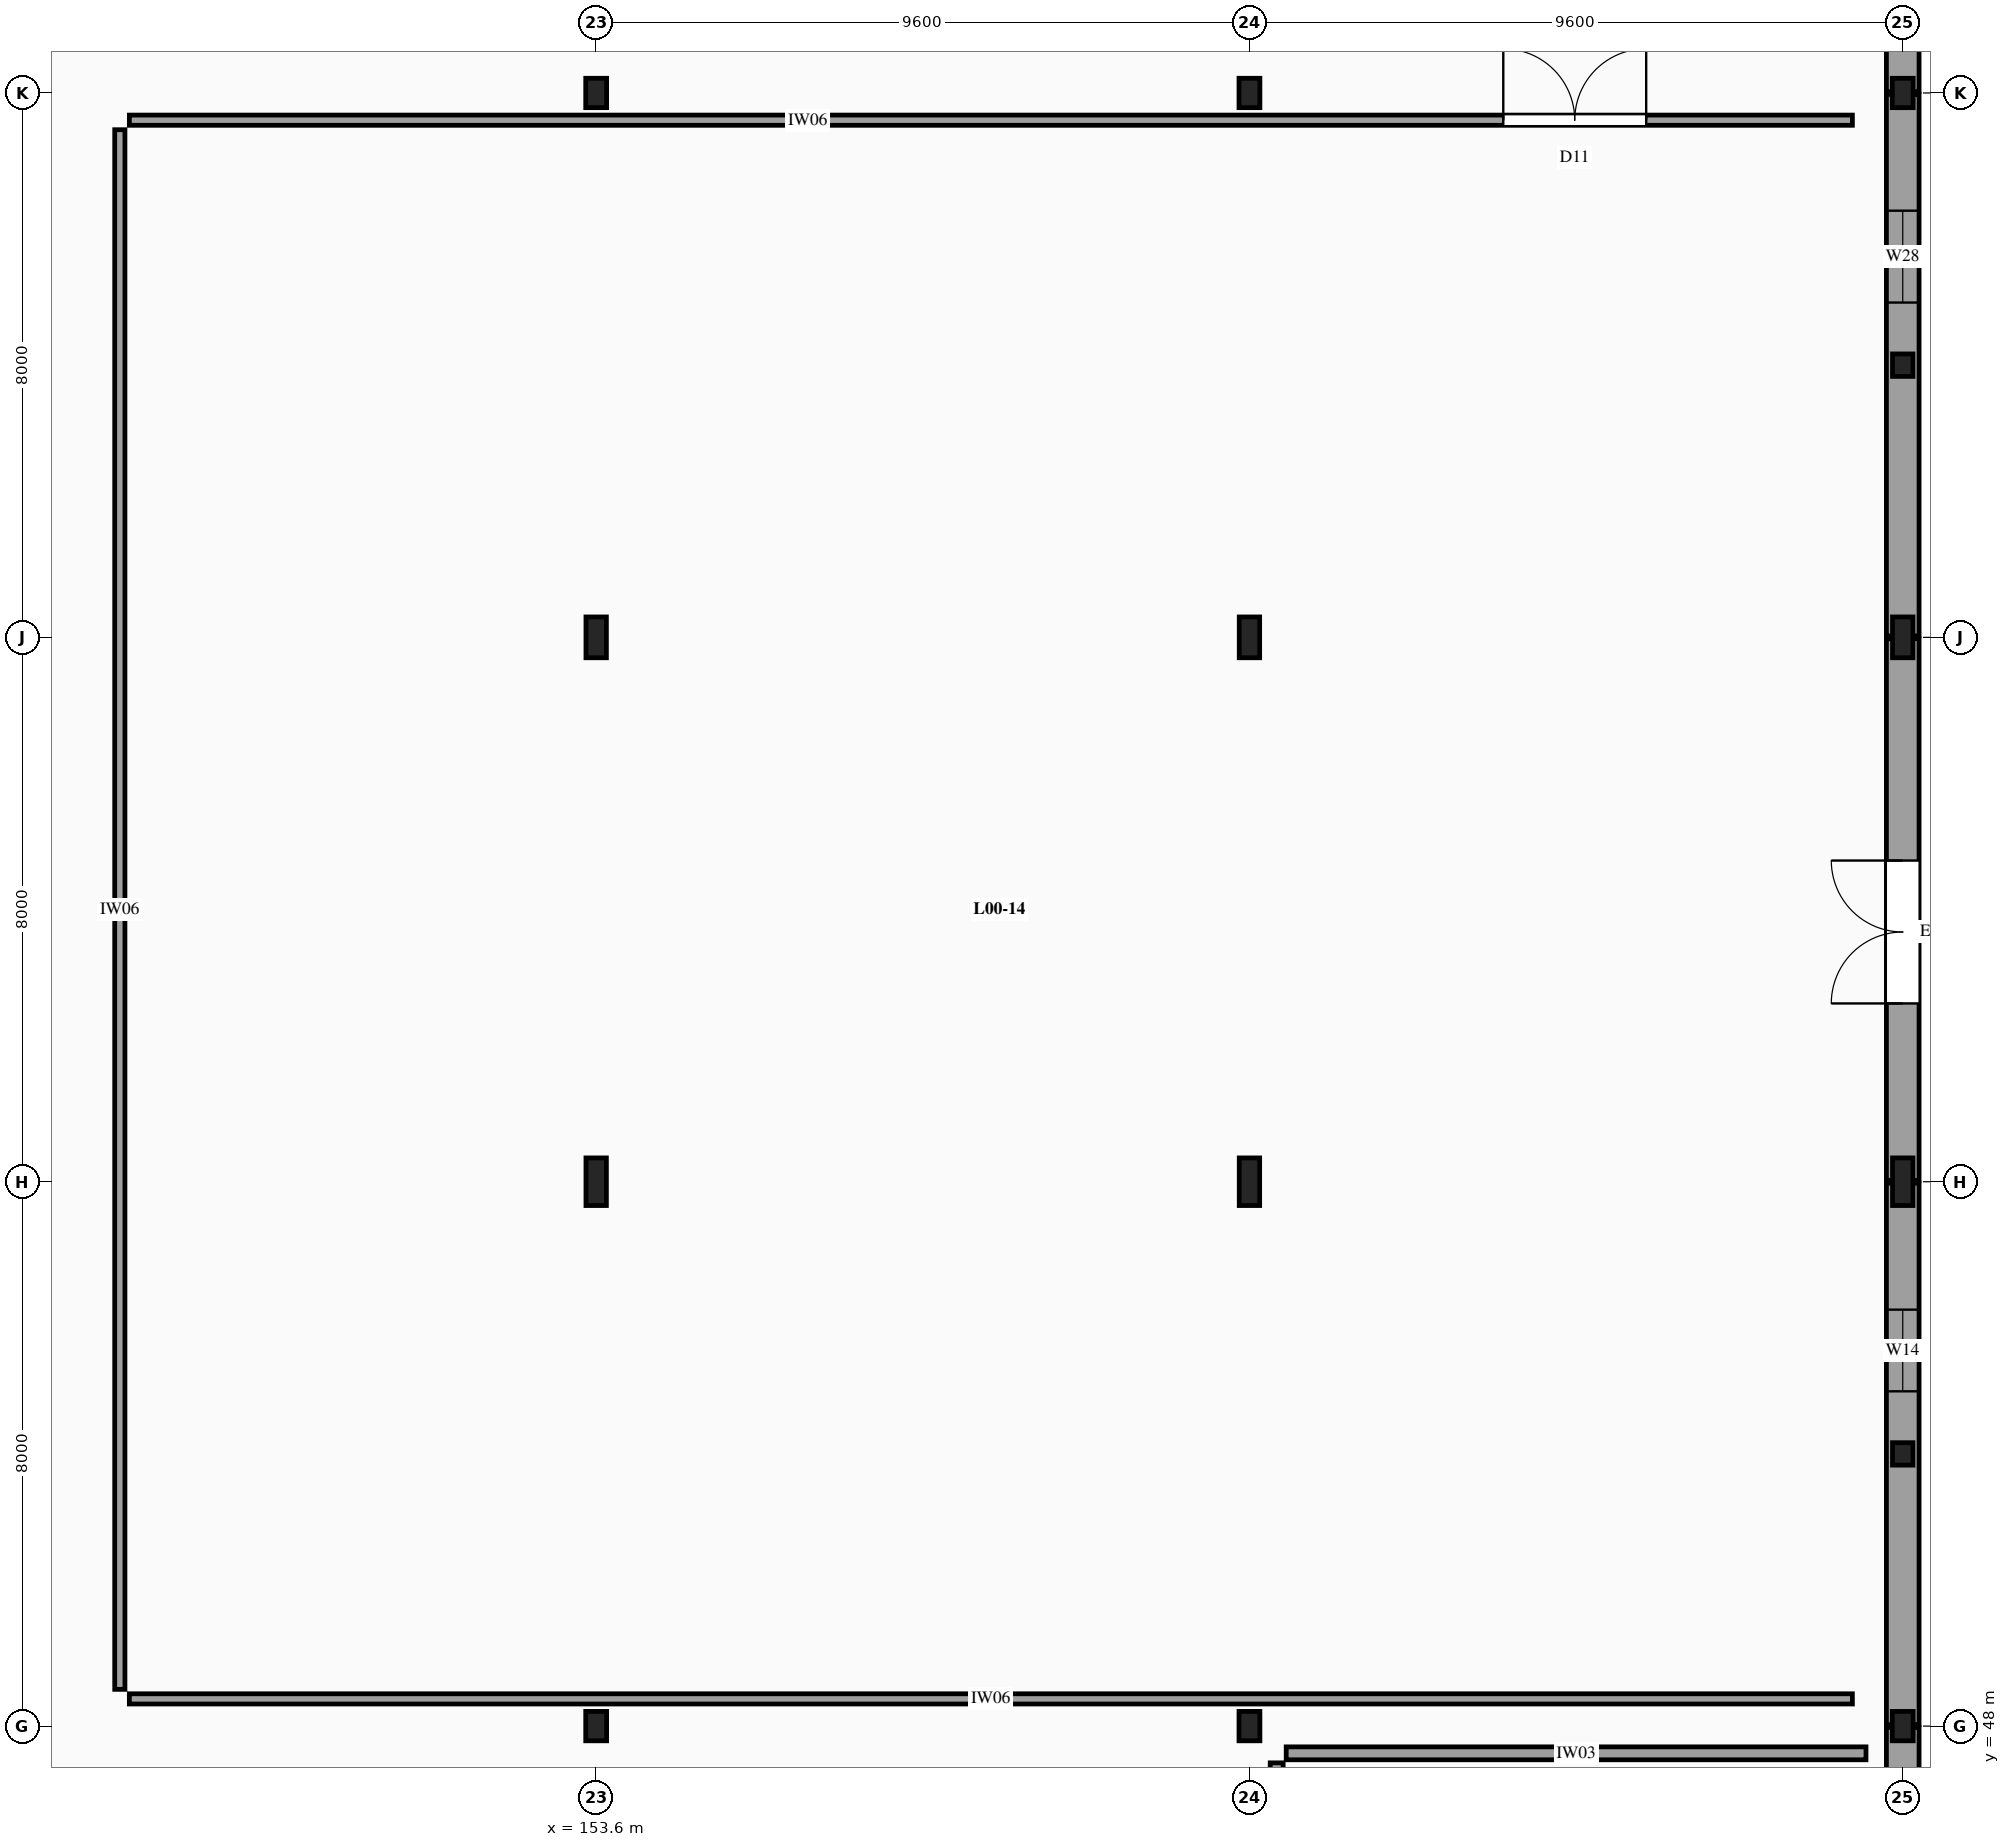
"""IFC4 building model, lengths in metres.
Left out: names, types, materials, properties, quantities, classifications, styles, units other than length and angle.
Written with IfcOpenShell. Run it as: python <this file> out.ifc"""

import sys

from ifc_helpers import new_model, si_unit, direction, frame, frame_2d, origin, origin_2d, place, context, subcontext, project, spatial, rectangle, i_section, extrude, element, fill, save


model = new_model("IFC4")
c1 = context("Model", 3, precision=1e-05, world=origin(), true_north=direction((0.0, 1.0)))
c2 = subcontext(c1, "Body", "Model", "MODEL_VIEW")
j1 = project(units=[si_unit("LENGTHUNIT", "METRE"), si_unit("PLANEANGLEUNIT", "RADIAN")], contexts=[c1])
p1 = place(None, origin())
s1 = spatial("IfcSite", under=j1, at=p1, CompositionType="ELEMENT")
p2 = place(p1, origin())
s2 = spatial("IfcBuilding", under=s1, at=p2, CompositionType="ELEMENT")
p3 = place(p2, origin())
s3 = spatial("IfcBuildingStorey", under=s2, at=p3, CompositionType="ELEMENT", Elevation=0.0)
p4 = place(p3, frame((153.6, 48.0, -0.28), z_axis=(0.0, 0.0, 1.0), x_axis=(1.0, 0.0, 0.0)))
e1 = element("IfcColumn", 1, at=p4, inside=s3, PredefinedType="COLUMN", context=c2, shape_type="SweptSolid", body=[
    extrude(i_section(OverallWidth=0.307, OverallDepth=0.432, WebThickness=0.021, FlangeThickness=0.04, FilletRadius=0.027, at=origin_2d()), origin(), (0.0, 0.0, 1.0), 4.52),
])
p5 = place(p3, frame((153.6, 56.0, -0.28), z_axis=(0.0, 0.0, 1.0), x_axis=(1.0, 0.0, 0.0)))
e2 = element("IfcColumn", 2, at=p5, inside=s3, PredefinedType="COLUMN", context=c2, shape_type="SweptSolid", body=[
    extrude(i_section(OverallWidth=0.3, OverallDepth=0.7, WebThickness=0.017, FlangeThickness=0.032, FilletRadius=0.027, at=origin_2d()), origin(), (0.0, 0.0, 1.0), 4.52),
])
p6 = place(p3, frame((153.6, 64.0, -0.28), z_axis=(0.0, 0.0, 1.0), x_axis=(1.0, 0.0, 0.0)))
e3 = element("IfcColumn", 3, at=p6, inside=s3, PredefinedType="COLUMN", context=c2, shape_type="SweptSolid", body=[
    extrude(i_section(OverallWidth=0.3, OverallDepth=0.6, WebThickness=0.015, FlangeThickness=0.03, FilletRadius=0.027, at=origin_2d()), origin(), (0.0, 0.0, 1.0), 4.52),
])
for number, where, z_axis, x_axis in (
    (4, (153.6, 72.0, -0.28), (0.0, 0.0, 1.0), (1.0, 0.0, 0.0)),
    (5, (163.2, 48.0, -0.28), (0.0, 0.0, 1.0), (1.0, 0.0, 0.0)),
):
    element("IfcColumn", number, at=place(p3, frame(where, z_axis=z_axis, x_axis=x_axis)), inside=s3, PredefinedType="COLUMN", context=c2, shape_type="SweptSolid", body=[
        extrude(i_section(OverallWidth=0.307, OverallDepth=0.432, WebThickness=0.021, FlangeThickness=0.04, FilletRadius=0.027, at=origin_2d()), origin(), (0.0, 0.0, 1.0), 4.52),
    ])
p7 = place(p3, frame((163.2, 56.0, -0.28), z_axis=(0.0, 0.0, 1.0), x_axis=(1.0, 0.0, 0.0)))
e6 = element("IfcColumn", 6, at=p7, inside=s3, PredefinedType="COLUMN", context=c2, shape_type="SweptSolid", body=[
    extrude(i_section(OverallWidth=0.3, OverallDepth=0.7, WebThickness=0.017, FlangeThickness=0.032, FilletRadius=0.027, at=origin_2d()), origin(), (0.0, 0.0, 1.0), 4.52),
])
p8 = place(p3, frame((163.2, 64.0, -0.28), z_axis=(0.0, 0.0, 1.0), x_axis=(1.0, 0.0, 0.0)))
e7 = element("IfcColumn", 7, at=p8, inside=s3, PredefinedType="COLUMN", context=c2, shape_type="SweptSolid", body=[
    extrude(i_section(OverallWidth=0.3, OverallDepth=0.6, WebThickness=0.015, FlangeThickness=0.03, FilletRadius=0.027, at=origin_2d()), origin(), (0.0, 0.0, 1.0), 4.52),
])
for number, where, z_axis, x_axis in (
    (8, (163.2, 72.0, -0.28), (0.0, 0.0, 1.0), (1.0, 0.0, 0.0)),
    (9, (172.8, 48.0, -0.28), (0.0, 0.0, 1.0), (1.0, 0.0, 0.0)),
):
    element("IfcColumn", number, at=place(p3, frame(where, z_axis=z_axis, x_axis=x_axis)), inside=s3, PredefinedType="COLUMN", context=c2, shape_type="SweptSolid", body=[
        extrude(i_section(OverallWidth=0.307, OverallDepth=0.432, WebThickness=0.021, FlangeThickness=0.04, FilletRadius=0.027, at=origin_2d()), origin(), (0.0, 0.0, 1.0), 4.52),
    ])
p9 = place(p3, frame((172.8, 56.0, -0.28), z_axis=(0.0, 0.0, 1.0), x_axis=(1.0, 0.0, 0.0)))
e10 = element("IfcColumn", 10, at=p9, inside=s3, PredefinedType="COLUMN", context=c2, shape_type="SweptSolid", body=[
    extrude(i_section(OverallWidth=0.3, OverallDepth=0.7, WebThickness=0.017, FlangeThickness=0.032, FilletRadius=0.027, at=origin_2d()), origin(), (0.0, 0.0, 1.0), 4.52),
])
p10 = place(p3, frame((172.8, 64.0, -0.28), z_axis=(0.0, 0.0, 1.0), x_axis=(1.0, 0.0, 0.0)))
e11 = element("IfcColumn", 11, at=p10, inside=s3, PredefinedType="COLUMN", context=c2, shape_type="SweptSolid", body=[
    extrude(i_section(OverallWidth=0.3, OverallDepth=0.6, WebThickness=0.015, FlangeThickness=0.03, FilletRadius=0.027, at=origin_2d()), origin(), (0.0, 0.0, 1.0), 4.52),
])
p11 = place(p3, frame((172.8, 72.0, -0.28), z_axis=(0.0, 0.0, 1.0), x_axis=(1.0, 0.0, 0.0)))
e12 = element("IfcColumn", 12, at=p11, inside=s3, PredefinedType="COLUMN", context=c2, shape_type="SweptSolid", body=[
    extrude(i_section(OverallWidth=0.307, OverallDepth=0.432, WebThickness=0.021, FlangeThickness=0.04, FilletRadius=0.027, at=origin_2d()), origin(), (0.0, 0.0, 1.0), 4.52),
])
for number, where, z_axis, x_axis in (
    (13, (172.8, 52.0, -0.28), (0.0, 0.0, 1.0), (1.0, 0.0, 0.0)),
    (14, (172.8, 68.0, -0.28), (0.0, 0.0, 1.0), (1.0, 0.0, 0.0)),
):
    element("IfcColumn", number, at=place(p3, frame(where, z_axis=z_axis, x_axis=x_axis)), inside=s3, PredefinedType="PILASTER", context=c2, shape_type="SweptSolid", body=[
        extrude(i_section(OverallWidth=0.3, OverallDepth=0.33, WebThickness=0.01, FlangeThickness=0.017, FilletRadius=0.027, at=origin_2d()), origin(), (0.0, 0.0, 1.0), 4.52),
    ])
p12 = place(p3, frame((172.8, 40.02, 0.0), z_axis=(0.0, 0.0, 1.0), x_axis=(0.0, 1.0, 0.0)))
e15 = element("IfcWall", 15, at=p12, inside=s3, PredefinedType="SOLIDWALL", context=c2, shape_type="SweptSolid", body=[
    extrude(rectangle(XDim=7.96, YDim=0.48, at=frame_2d((3.98, 0.0))), origin(), (0.0, 0.0, 1.0), 3.56),
])
p13 = place(p12, frame((2.6, 0.0, 0.0)))
e16 = element("IfcOpeningElement", 16, at=p13, cuts=e15, PredefinedType="OPENING", context=c2, shape_type="SweptSolid", body=[
    extrude(rectangle(XDim=2.1, YDim=2.4, at=frame_2d((1.05, 1.2))), frame((0.0, 0.25, 0.0), z_axis=(0.0, -1.0, 0.0), x_axis=(1.0, 0.0, 0.0)), (0.0, 0.0, 1.0), 0.5),
])
p14 = place(p3, frame((172.8, 48.02, 0.0), z_axis=(0.0, 0.0, 1.0), x_axis=(0.0, 1.0, 0.0)))
e17 = element("IfcWall", 17, at=p14, inside=s3, PredefinedType="SOLIDWALL", context=c2, shape_type="SweptSolid", body=[
    extrude(rectangle(XDim=7.96, YDim=0.48, at=frame_2d((3.98, 0.0))), origin(), (0.0, 0.0, 1.0), 3.56),
])
p15 = place(p14, frame((4.9, 0.0, 0.9)))
e18 = element("IfcOpeningElement", 18, at=p15, cuts=e17, PredefinedType="OPENING", context=c2, shape_type="SweptSolid", body=[
    extrude(rectangle(XDim=1.2, YDim=1.8, at=frame_2d((0.6, 0.9))), frame((0.0, 0.25, 0.0), z_axis=(0.0, -1.0, 0.0), x_axis=(1.0, 0.0, 0.0)), (0.0, 0.0, 1.0), 0.5),
])
p16 = place(p3, frame((172.8, 56.02, 0.0), z_axis=(0.0, 0.0, 1.0), x_axis=(0.0, 1.0, 0.0)))
e19 = element("IfcWall", 19, at=p16, inside=s3, PredefinedType="SOLIDWALL", context=c2, shape_type="SweptSolid", body=[
    extrude(rectangle(XDim=7.96, YDim=0.48, at=frame_2d((3.98, 0.0))), origin(), (0.0, 0.0, 1.0), 3.56),
])
p17 = place(p16, frame((2.6, 0.0, 0.0)))
e20 = element("IfcOpeningElement", 20, at=p17, cuts=e19, PredefinedType="OPENING", context=c2, shape_type="SweptSolid", body=[
    extrude(rectangle(XDim=2.1, YDim=2.4, at=frame_2d((1.05, 1.2))), frame((0.0, 0.25, 0.0), z_axis=(0.0, -1.0, 0.0), x_axis=(1.0, 0.0, 0.0)), (0.0, 0.0, 1.0), 0.5),
])
p18 = place(p3, frame((172.8, 64.02, 0.0), z_axis=(0.0, 0.0, 1.0), x_axis=(0.0, 1.0, 0.0)))
e21 = element("IfcWall", 21, at=p18, inside=s3, PredefinedType="SOLIDWALL", context=c2, shape_type="SweptSolid", body=[
    extrude(rectangle(XDim=7.96, YDim=0.48, at=frame_2d((3.98, 0.0))), origin(), (0.0, 0.0, 1.0), 3.56),
])
p19 = place(p18, frame((4.9, 0.0, 0.9)))
e22 = element("IfcOpeningElement", 22, at=p19, cuts=e21, PredefinedType="OPENING", context=c2, shape_type="SweptSolid", body=[
    extrude(rectangle(XDim=1.35, YDim=1.7, at=frame_2d((0.675, 0.85))), frame((0.0, 0.25, 0.0), z_axis=(0.0, -1.0, 0.0), x_axis=(1.0, 0.0, 0.0)), (0.0, 0.0, 1.0), 0.5),
])
p20 = place(p3, frame((172.8, 72.02, 0.0), z_axis=(0.0, 0.0, 1.0), x_axis=(0.0, 1.0, 0.0)))
e23 = element("IfcWall", 23, at=p20, inside=s3, PredefinedType="SOLIDWALL", context=c2, shape_type="SweptSolid", body=[
    extrude(rectangle(XDim=7.96, YDim=0.48, at=frame_2d((3.98, 0.0))), origin(), (0.0, 0.0, 1.0), 3.56),
])
p21 = place(p20, frame((2.6, 0.0, 0.0)))
e24 = element("IfcOpeningElement", 24, at=p21, cuts=e23, PredefinedType="OPENING", context=c2, shape_type="SweptSolid", body=[
    extrude(rectangle(XDim=2.1, YDim=2.4, at=frame_2d((1.05, 1.2))), frame((0.0, 0.25, 0.0), z_axis=(0.0, -1.0, 0.0), x_axis=(1.0, 0.0, 0.0)), (0.0, 0.0, 1.0), 0.5),
])
p22 = place(p3, frame((163.74, 47.6, 0.0), z_axis=(0.0, 0.0, 1.0), x_axis=(1.0, 0.0, 0.0)))
e25 = element("IfcWall", 25, at=p22, inside=s3, PredefinedType="SOLIDWALL", context=c2, shape_type="SweptSolid", body=[
    extrude(rectangle(XDim=8.52, YDim=0.19, at=frame_2d((4.26, 0.0))), origin(), (0.0, 0.0, 1.0), 3.6),
])
p23 = place(p3, frame((163.6, 32.54, 0.0), z_axis=(0.0, 0.0, 1.0), x_axis=(0.0, 1.0, 0.0)))
e26 = element("IfcWall", 26, at=p23, inside=s3, PredefinedType="SOLIDWALL", context=c2, shape_type="SweptSolid", body=[
    extrude(rectangle(XDim=14.92, YDim=0.19, at=frame_2d((7.46, 0.0))), origin(), (0.0, 0.0, 1.0), 3.6),
])
p24 = place(p23, frame((2.148, 0.0, 0.0)))
e27 = element("IfcOpeningElement", 27, at=p24, cuts=e26, PredefinedType="OPENING", context=c2, shape_type="SweptSolid", body=[
    extrude(rectangle(XDim=2.4, YDim=2.8, at=frame_2d((1.2, 1.4))), frame((0.0, 0.105, 0.0), z_axis=(0.0, -1.0, 0.0), x_axis=(1.0, 0.0, 0.0)), (0.0, 0.0, 1.0), 0.21),
])
p25 = place(p3, frame((146.74, 71.6, 0.0), z_axis=(0.0, 0.0, 1.0), x_axis=(1.0, 0.0, 0.0)))
e28 = element("IfcWall", 28, at=p25, inside=s3, PredefinedType="PARTITIONING", context=c2, shape_type="SweptSolid", body=[
    extrude(rectangle(XDim=25.32, YDim=0.15, at=frame_2d((12.66, 0.0))), origin(), (0.0, 0.0, 1.0), 3.6),
])
p26 = place(p25, frame((20.19, 0.0, 0.0)))
e29 = element("IfcOpeningElement", 29, at=p26, cuts=e28, PredefinedType="OPENING", context=c2, shape_type="SweptSolid", body=[
    extrude(rectangle(XDim=2.1, YDim=2.65, at=frame_2d((1.05, 1.325))), frame((0.0, 0.085, 0.0), z_axis=(0.0, -1.0, 0.0), x_axis=(1.0, 0.0, 0.0)), (0.0, 0.0, 1.0), 0.17),
])
p27 = place(p3, frame((146.74, 48.4, 0.0), z_axis=(0.0, 0.0, 1.0), x_axis=(1.0, 0.0, 0.0)))
e30 = element("IfcWall", 30, at=p27, inside=s3, PredefinedType="PARTITIONING", context=c2, shape_type="SweptSolid", body=[
    extrude(rectangle(XDim=25.32, YDim=0.15, at=frame_2d((12.66, 0.0))), origin(), (0.0, 0.0, 1.0), 3.6),
])
p28 = place(p3, frame((146.6, 48.54, 0.0), z_axis=(0.0, 0.0, 1.0), x_axis=(0.0, 1.0, 0.0)))
e31 = element("IfcWall", 31, at=p28, inside=s3, PredefinedType="PARTITIONING", context=c2, shape_type="SweptSolid", body=[
    extrude(rectangle(XDim=22.92, YDim=0.15, at=frame_2d((11.46, 0.0))), origin(), (0.0, 0.0, 1.0), 3.6),
])
p29 = place(p15, origin())
e32 = element("IfcWindow", 32, at=p29, inside=s3, PartitioningType="SINGLE_PANEL", PredefinedType="WINDOW", context=c2, shape_type="SweptSolid", body=[
    extrude(rectangle(XDim=1.2, YDim=1.8, at=frame_2d((0.6, 0.9))), frame((0.0, 0.03, 0.0), z_axis=(0.0, -1.0, 0.0), x_axis=(1.0, 0.0, 0.0)), (0.0, 0.0, 1.0), 0.06),
])
fill(e18, e32)
p30 = place(p17, frame((2.1, 0.0, 0.0), z_axis=(0.0, 0.0, 1.0), x_axis=(-1.0, 0.0, 0.0)))
e33 = element("IfcDoor", 33, at=p30, inside=s3, OperationType="DOUBLE_DOOR_SINGLE_SWING", PredefinedType="DOOR", context=c2, shape_type="SweptSolid", body=[
    extrude(rectangle(XDim=2.1, YDim=2.4, at=frame_2d((1.05, 1.2))), frame((0.0, 0.025, 0.0), z_axis=(0.0, -1.0, 0.0), x_axis=(1.0, 0.0, 0.0)), (0.0, 0.0, 1.0), 0.05),
])
fill(e20, e33)
p31 = place(p19, origin())
e34 = element("IfcWindow", 34, at=p31, inside=s3, PartitioningType="SINGLE_PANEL", PredefinedType="WINDOW", context=c2, shape_type="SweptSolid", body=[
    extrude(rectangle(XDim=1.35, YDim=1.7, at=frame_2d((0.675, 0.85))), frame((0.0, 0.03, 0.0), z_axis=(0.0, -1.0, 0.0), x_axis=(1.0, 0.0, 0.0)), (0.0, 0.0, 1.0), 0.06),
])
fill(e22, e34)
p32 = place(p26, origin())
e35 = element("IfcDoor", 35, at=p32, inside=s3, OperationType="DOUBLE_DOOR_SINGLE_SWING", PredefinedType="DOOR", context=c2, shape_type="SweptSolid", body=[
    extrude(rectangle(XDim=2.1, YDim=2.65, at=frame_2d((1.05, 1.325))), frame((0.0, 0.025, 0.0), z_axis=(0.0, -1.0, 0.0), x_axis=(1.0, 0.0, 0.0)), (0.0, 0.0, 1.0), 0.05),
])
fill(e29, e35)
save(model, sys.argv[1])
